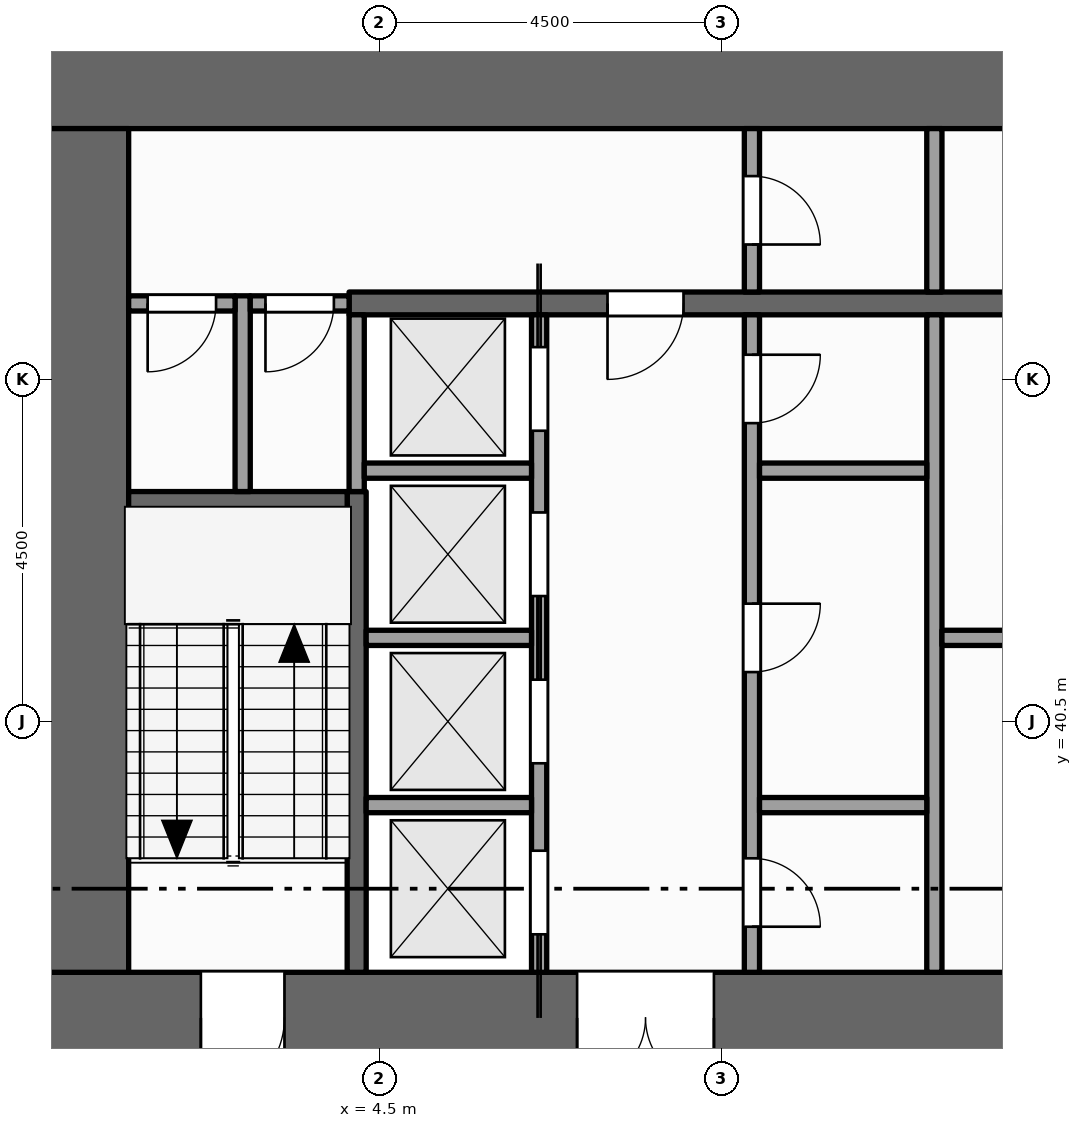
"""IFC4 building model, lengths in metres.
Left out: names, types, materials, properties, quantities, classifications, styles, units other than length and angle.
Written with IfcOpenShell. Run it as: python <this file> out.ifc"""

import sys

from ifc_helpers import new_model, si_unit, direction, frame, frame_2d, origin, place, context, subcontext, project, spatial, rectangle, extrude, element, fill, save


model = new_model("IFC4")
c1 = context("Model", 3, precision=1e-05, world=origin(), true_north=direction((0.0, 1.0)))
c2 = subcontext(c1, "Body", "Model", "MODEL_VIEW")
j1 = project(units=[si_unit("LENGTHUNIT", "METRE"), si_unit("PLANEANGLEUNIT", "RADIAN")], contexts=[c1])
p1 = place(None, origin())
s1 = spatial("IfcSite", under=j1, at=p1, CompositionType="ELEMENT")
p2 = place(p1, origin())
s2 = spatial("IfcBuilding", under=s1, at=p2, CompositionType="ELEMENT")
p3 = place(p2, frame((0.0, 0.0, 49.0)))
s3 = spatial("IfcBuildingStorey", under=s2, at=p3, CompositionType="ELEMENT", Elevation=49.0)
p4 = place(p3, frame((0.0, 36.6, -0.15), z_axis=(0.0, 0.0, 1.0), x_axis=(1.0, 0.0, 0.0)))
e1 = element("IfcWall", 1, at=p4, inside=s3, PredefinedType="SHEAR", context=c2, shape_type="SweptSolid", body=[
    extrude(rectangle(XDim=22.5, YDim=1.2, at=frame_2d((11.25, 0.0))), origin(), (0.0, 0.0, 1.0), 4.0),
])
p5 = place(p4, frame((7.1, 0.0, 0.15)))
e2 = element("IfcOpeningElement", 2, at=p5, cuts=e1, PredefinedType="OPENING", context=c2, shape_type="SweptSolid", body=[
    extrude(rectangle(XDim=1.8, YDim=2.1, at=frame_2d((0.9, 1.05))), frame((0.0, 0.61, 0.0), z_axis=(0.0, -1.0, 0.0), x_axis=(1.0, 0.0, 0.0)), (0.0, 0.0, 1.0), 1.22),
])
p6 = place(p4, frame((13.15, 0.0, 0.15)))
e3 = element("IfcOpeningElement", 3, at=p6, cuts=e1, PredefinedType="OPENING", context=c2, shape_type="SweptSolid", body=[
    extrude(rectangle(XDim=1.1, YDim=2.1, at=frame_2d((0.55, 1.05))), frame((0.0, 0.61, 0.0), z_axis=(0.0, -1.0, 0.0), x_axis=(1.0, 0.0, 0.0)), (0.0, 0.0, 1.0), 1.22),
])
p7 = place(p4, frame((2.15, 0.0, 0.15)))
e4 = element("IfcOpeningElement", 4, at=p7, cuts=e1, PredefinedType="OPENING", context=c2, shape_type="SweptSolid", body=[
    extrude(rectangle(XDim=1.1, YDim=2.1, at=frame_2d((0.55, 1.05))), frame((0.0, 0.61, 0.0), z_axis=(0.0, -1.0, 0.0), x_axis=(1.0, 0.0, 0.0)), (0.0, 0.0, 1.0), 1.22),
])
p8 = place(p4, frame((19.35, 0.0, 0.15)))
e5 = element("IfcOpeningElement", 5, at=p8, cuts=e1, PredefinedType="OPENING", context=c2, shape_type="SweptSolid", body=[
    extrude(rectangle(XDim=1.1, YDim=2.1, at=frame_2d((0.55, 1.05))), frame((0.0, 0.61, 0.0), z_axis=(0.0, -1.0, 0.0), x_axis=(1.0, 0.0, 0.0)), (0.0, 0.0, 1.0), 1.22),
])
p9 = place(p3, frame((0.0, 48.9, -0.15), z_axis=(0.0, 0.0, 1.0), x_axis=(1.0, 0.0, 0.0)))
e6 = element("IfcWall", 6, at=p9, inside=s3, PredefinedType="SHEAR", context=c2, shape_type="SweptSolid", body=[
    extrude(rectangle(XDim=22.5, YDim=1.2, at=frame_2d((11.25, 0.0))), origin(), (0.0, 0.0, 1.0), 4.0),
])
p10 = place(p3, frame((0.6, 37.2, -0.15), z_axis=(0.0, 0.0, 1.0), x_axis=(0.0, 1.0, 0.0)))
e7 = element("IfcWall", 7, at=p10, inside=s3, PredefinedType="SHEAR", context=c2, shape_type="SweptSolid", body=[
    extrude(rectangle(XDim=11.1, YDim=1.2, at=frame_2d((5.55, 0.0))), origin(), (0.0, 0.0, 1.0), 4.0),
])
p11 = place(p3, frame((2.7, 43.525, 0.0), z_axis=(0.0, 0.0, 1.0), x_axis=(0.0, 1.0, 0.0)))
e8 = element("IfcWall", 8, at=p11, inside=s3, PredefinedType="PARTITIONING", context=c2, shape_type="SweptSolid", body=[
    extrude(rectangle(XDim=2.575, YDim=0.2, at=frame_2d((1.288, 0.0))), origin(), (0.0, 0.0, 1.0), 3.85),
])
p12 = place(p3, frame((4.2, 37.2, 0.0), z_axis=(0.0, 0.0, 1.0), x_axis=(0.0, 1.0, 0.0)))
e9 = element("IfcWall", 9, at=p12, inside=s3, PredefinedType="SHEAR", context=c2, shape_type="SweptSolid", body=[
    extrude(rectangle(XDim=6.325, YDim=0.25, at=frame_2d((3.163, 0.0))), origin(), (0.0, 0.0, 1.0), 3.85),
])
p13 = place(p3, frame((4.2, 43.525, 0.0), z_axis=(0.0, 0.0, 1.0), x_axis=(0.0, 1.0, 0.0)))
e10 = element("IfcWall", 10, at=p13, inside=s3, PredefinedType="SOLIDWALL", context=c2, shape_type="SweptSolid", body=[
    extrude(rectangle(XDim=2.325, YDim=0.2, at=frame_2d((1.163, 0.0))), origin(), (0.0, 0.0, 1.0), 3.85),
])
p14 = place(p3, frame((6.6, 37.2, 0.0), z_axis=(0.0, 0.0, 1.0), x_axis=(0.0, 1.0, 0.0)))
e11 = element("IfcWall", 11, at=p14, inside=s3, PredefinedType="SOLIDWALL", context=c2, shape_type="SweptSolid", body=[
    extrude(rectangle(XDim=8.65, YDim=0.2, at=frame_2d((4.325, 0.0))), origin(), (0.0, 0.0, 1.0), 3.85),
])
p15 = place(p14, frame((0.5, 0.0, 0.012)))
e12 = element("IfcOpeningElement", 12, at=p15, cuts=e11, PredefinedType="OPENING", context=c2, shape_type="SweptSolid", body=[
    extrude(rectangle(XDim=1.1, YDim=2.1, at=frame_2d((0.55, 1.05))), frame((0.0, 0.11, 0.0), z_axis=(0.0, -1.0, 0.0), x_axis=(1.0, 0.0, 0.0)), (0.0, 0.0, 1.0), 0.22),
])
p16 = place(p14, frame((2.75, 0.0, 0.012)))
e13 = element("IfcOpeningElement", 13, at=p16, cuts=e11, PredefinedType="OPENING", context=c2, shape_type="SweptSolid", body=[
    extrude(rectangle(XDim=1.1, YDim=2.1, at=frame_2d((0.55, 1.05))), frame((0.0, 0.11, 0.0), z_axis=(0.0, -1.0, 0.0), x_axis=(1.0, 0.0, 0.0)), (0.0, 0.0, 1.0), 0.22),
])
p17 = place(p14, frame((4.95, 0.0, 0.012)))
e14 = element("IfcOpeningElement", 14, at=p17, cuts=e11, PredefinedType="OPENING", context=c2, shape_type="SweptSolid", body=[
    extrude(rectangle(XDim=1.1, YDim=2.1, at=frame_2d((0.55, 1.05))), frame((0.0, 0.11, 0.0), z_axis=(0.0, -1.0, 0.0), x_axis=(1.0, 0.0, 0.0)), (0.0, 0.0, 1.0), 0.22),
])
p18 = place(p14, frame((7.125, 0.0, 0.012)))
e15 = element("IfcOpeningElement", 15, at=p18, cuts=e11, PredefinedType="OPENING", context=c2, shape_type="SweptSolid", body=[
    extrude(rectangle(XDim=1.1, YDim=2.1, at=frame_2d((0.55, 1.05))), frame((0.0, 0.11, 0.0), z_axis=(0.0, -1.0, 0.0), x_axis=(1.0, 0.0, 0.0)), (0.0, 0.0, 1.0), 0.22),
])
p19 = place(p3, frame((9.4, 37.2, 0.0), z_axis=(0.0, 0.0, 1.0), x_axis=(0.0, 1.0, 0.0)))
e16 = element("IfcWall", 16, at=p19, inside=s3, PredefinedType="PARTITIONING", context=c2, shape_type="SweptSolid", body=[
    extrude(rectangle(XDim=8.65, YDim=0.2, at=frame_2d((4.325, 0.0))), origin(), (0.0, 0.0, 1.0), 3.85),
])
p20 = place(p19, frame((0.6, 0.0, 0.0)))
e17 = element("IfcOpeningElement", 17, at=p20, cuts=e16, PredefinedType="OPENING", context=c2, shape_type="SweptSolid", body=[
    extrude(rectangle(XDim=0.9, YDim=2.1, at=frame_2d((0.45, 1.05))), frame((0.0, 0.11, 0.0), z_axis=(0.0, -1.0, 0.0), x_axis=(1.0, 0.0, 0.0)), (0.0, 0.0, 1.0), 0.22),
])
p21 = place(p19, frame((3.95, 0.0, 0.0)))
e18 = element("IfcOpeningElement", 18, at=p21, cuts=e16, PredefinedType="OPENING", context=c2, shape_type="SweptSolid", body=[
    extrude(rectangle(XDim=0.9, YDim=2.1, at=frame_2d((0.45, 1.05))), frame((0.0, 0.11, 0.0), z_axis=(0.0, -1.0, 0.0), x_axis=(1.0, 0.0, 0.0)), (0.0, 0.0, 1.0), 0.22),
])
p22 = place(p19, frame((7.225, 0.0, 0.0)))
e19 = element("IfcOpeningElement", 19, at=p22, cuts=e16, PredefinedType="OPENING", context=c2, shape_type="SweptSolid", body=[
    extrude(rectangle(XDim=0.9, YDim=2.1, at=frame_2d((0.45, 1.05))), frame((0.0, 0.11, 0.0), z_axis=(0.0, -1.0, 0.0), x_axis=(1.0, 0.0, 0.0)), (0.0, 0.0, 1.0), 0.22),
])
p23 = place(p3, frame((9.4, 46.15, 0.0), z_axis=(0.0, 0.0, 1.0), x_axis=(0.0, 1.0, 0.0)))
e20 = element("IfcWall", 20, at=p23, inside=s3, PredefinedType="PARTITIONING", context=c2, shape_type="SweptSolid", body=[
    extrude(rectangle(XDim=2.15, YDim=0.2, at=frame_2d((1.075, 0.0))), origin(), (0.0, 0.0, 1.0), 3.85),
])
p24 = place(p23, frame((0.625, 0.0, 0.0)))
e21 = element("IfcOpeningElement", 21, at=p24, cuts=e20, PredefinedType="OPENING", context=c2, shape_type="SweptSolid", body=[
    extrude(rectangle(XDim=0.9, YDim=2.1, at=frame_2d((0.45, 1.05))), frame((0.0, 0.11, 0.0), z_axis=(0.0, -1.0, 0.0), x_axis=(1.0, 0.0, 0.0)), (0.0, 0.0, 1.0), 0.22),
])
p25 = place(p3, frame((11.8, 37.2, 0.0), z_axis=(0.0, 0.0, 1.0), x_axis=(0.0, 1.0, 0.0)))
e22 = element("IfcWall", 22, at=p25, inside=s3, PredefinedType="PARTITIONING", context=c2, shape_type="SweptSolid", body=[
    extrude(rectangle(XDim=8.65, YDim=0.2, at=frame_2d((4.325, 0.0))), origin(), (0.0, 0.0, 1.0), 3.85),
])
p26 = place(p3, frame((11.8, 46.15, 0.0), z_axis=(0.0, 0.0, 1.0), x_axis=(0.0, 1.0, 0.0)))
e23 = element("IfcWall", 23, at=p26, inside=s3, PredefinedType="PARTITIONING", context=c2, shape_type="SweptSolid", body=[
    extrude(rectangle(XDim=2.15, YDim=0.2, at=frame_2d((1.075, 0.0))), origin(), (0.0, 0.0, 1.0), 3.85),
])
p27 = place(p3, frame((4.325, 39.4, 0.0), z_axis=(0.0, 0.0, 1.0), x_axis=(1.0, 0.0, 0.0)))
e24 = element("IfcWall", 24, at=p27, inside=s3, PredefinedType="SOLIDWALL", context=c2, shape_type="SweptSolid", body=[
    extrude(rectangle(XDim=2.175, YDim=0.2, at=frame_2d((1.087, 0.0))), origin(), (0.0, 0.0, 1.0), 3.85),
])
p28 = place(p3, frame((9.5, 39.4, 0.0), z_axis=(0.0, 0.0, 1.0), x_axis=(1.0, 0.0, 0.0)))
e25 = element("IfcWall", 25, at=p28, inside=s3, PredefinedType="PARTITIONING", context=c2, shape_type="SweptSolid", body=[
    extrude(rectangle(XDim=2.2, YDim=0.2, at=frame_2d((1.1, 0.0))), origin(), (0.0, 0.0, 1.0), 3.85),
])
p29 = place(p3, frame((4.325, 41.6, 0.0), z_axis=(0.0, 0.0, 1.0), x_axis=(1.0, 0.0, 0.0)))
e26 = element("IfcWall", 26, at=p29, inside=s3, PredefinedType="SOLIDWALL", context=c2, shape_type="SweptSolid", body=[
    extrude(rectangle(XDim=2.175, YDim=0.2, at=frame_2d((1.087, 0.0))), origin(), (0.0, 0.0, 1.0), 3.85),
])
p30 = place(p3, frame((11.9, 41.6, 0.0), z_axis=(0.0, 0.0, 1.0), x_axis=(1.0, 0.0, 0.0)))
e27 = element("IfcWall", 27, at=p30, inside=s3, PredefinedType="PARTITIONING", context=c2, shape_type="SweptSolid", body=[
    extrude(rectangle(XDim=3.6, YDim=0.2, at=frame_2d((1.8, 0.0))), origin(), (0.0, 0.0, 1.0), 3.85),
])
p31 = place(p30, frame((1.3, 0.0, 0.0)))
e28 = element("IfcOpeningElement", 28, at=p31, cuts=e27, PredefinedType="OPENING", context=c2, shape_type="SweptSolid", body=[
    extrude(rectangle(XDim=1.0, YDim=2.1, at=frame_2d((0.5, 1.05))), frame((0.0, 0.11, 0.0), z_axis=(0.0, -1.0, 0.0), x_axis=(1.0, 0.0, 0.0)), (0.0, 0.0, 1.0), 0.22),
])
p32 = place(p3, frame((1.2, 43.4, 0.0), z_axis=(0.0, 0.0, 1.0), x_axis=(1.0, 0.0, 0.0)))
e29 = element("IfcWall", 29, at=p32, inside=s3, PredefinedType="SHEAR", context=c2, shape_type="SweptSolid", body=[
    extrude(rectangle(XDim=2.875, YDim=0.25, at=frame_2d((1.438, 0.0))), origin(), (0.0, 0.0, 1.0), 3.85),
])
p33 = place(p3, frame((4.3, 43.8, 0.0), z_axis=(0.0, 0.0, 1.0), x_axis=(1.0, 0.0, 0.0)))
e30 = element("IfcWall", 30, at=p33, inside=s3, PredefinedType="SOLIDWALL", context=c2, shape_type="SweptSolid", body=[
    extrude(rectangle(XDim=2.2, YDim=0.2, at=frame_2d((1.1, 0.0))), origin(), (0.0, 0.0, 1.0), 3.85),
])
p34 = place(p3, frame((9.5, 43.8, 0.0), z_axis=(0.0, 0.0, 1.0), x_axis=(1.0, 0.0, 0.0)))
e31 = element("IfcWall", 31, at=p34, inside=s3, PredefinedType="PARTITIONING", context=c2, shape_type="SweptSolid", body=[
    extrude(rectangle(XDim=2.2, YDim=0.2, at=frame_2d((1.1, 0.0))), origin(), (0.0, 0.0, 1.0), 3.85),
])
p35 = place(p3, frame((1.2, 46.0, 0.0), z_axis=(0.0, 0.0, 1.0), x_axis=(1.0, 0.0, 0.0)))
e32 = element("IfcWall", 32, at=p35, inside=s3, PredefinedType="PARTITIONING", context=c2, shape_type="SweptSolid", body=[
    extrude(rectangle(XDim=1.4, YDim=0.2, at=frame_2d((0.7, 0.0))), origin(), (0.0, 0.0, 1.0), 3.85),
])
p36 = place(p35, frame((0.25, 0.0, 0.0)))
e33 = element("IfcOpeningElement", 33, at=p36, cuts=e32, PredefinedType="OPENING", context=c2, shape_type="SweptSolid", body=[
    extrude(rectangle(XDim=0.9, YDim=2.1, at=frame_2d((0.45, 1.05))), frame((0.0, 0.11, 0.0), z_axis=(0.0, -1.0, 0.0), x_axis=(1.0, 0.0, 0.0)), (0.0, 0.0, 1.0), 0.22),
])
p37 = place(p3, frame((2.8, 46.0, 0.0), z_axis=(0.0, 0.0, 1.0), x_axis=(1.0, 0.0, 0.0)))
e34 = element("IfcWall", 34, at=p37, inside=s3, PredefinedType="PARTITIONING", context=c2, shape_type="SweptSolid", body=[
    extrude(rectangle(XDim=1.3, YDim=0.2, at=frame_2d((0.65, 0.0))), origin(), (0.0, 0.0, 1.0), 3.85),
])
p38 = place(p37, frame((0.2, 0.0, 0.0)))
e35 = element("IfcOpeningElement", 35, at=p38, cuts=e34, PredefinedType="OPENING", context=c2, shape_type="SweptSolid", body=[
    extrude(rectangle(XDim=0.9, YDim=2.1, at=frame_2d((0.45, 1.05))), frame((0.0, 0.11, 0.0), z_axis=(0.0, -1.0, 0.0), x_axis=(1.0, 0.0, 0.0)), (0.0, 0.0, 1.0), 0.22),
])
p39 = place(p3, frame((4.1, 46.0, 0.0), z_axis=(0.0, 0.0, 1.0), x_axis=(1.0, 0.0, 0.0)))
e36 = element("IfcWall", 36, at=p39, inside=s3, PredefinedType="SHEAR", context=c2, shape_type="SweptSolid", body=[
    extrude(rectangle(XDim=14.5, YDim=0.3, at=frame_2d((7.25, 0.0))), origin(), (0.0, 0.0, 1.0), 3.85),
])
p40 = place(p39, frame((3.4, 0.0, 0.0)))
e37 = element("IfcOpeningElement", 37, at=p40, cuts=e36, PredefinedType="OPENING", context=c2, shape_type="SweptSolid", body=[
    extrude(rectangle(XDim=1.0, YDim=2.1, at=frame_2d((0.5, 1.05))), frame((0.0, 0.16, 0.0), z_axis=(0.0, -1.0, 0.0), x_axis=(1.0, 0.0, 0.0)), (0.0, 0.0, 1.0), 0.32),
])
p41 = place(p39, frame((9.1, 0.0, 0.0)))
e38 = element("IfcOpeningElement", 38, at=p41, cuts=e36, PredefinedType="OPENING", context=c2, shape_type="SweptSolid", body=[
    extrude(rectangle(XDim=1.0, YDim=2.1, at=frame_2d((0.5, 1.05))), frame((0.0, 0.16, 0.0), z_axis=(0.0, -1.0, 0.0), x_axis=(1.0, 0.0, 0.0)), (0.0, 0.0, 1.0), 0.32),
])
p42 = place(p15, origin())
e39 = element("IfcDoor", 39, at=p42, inside=s3, OperationType="SLIDING_TO_LEFT", PredefinedType="DOOR", context=c2, shape_type="SweptSolid", body=[
    extrude(rectangle(XDim=1.1, YDim=2.1, at=frame_2d((0.55, 1.05))), frame((0.0, 0.025, 0.0), z_axis=(0.0, -1.0, 0.0), x_axis=(1.0, 0.0, 0.0)), (0.0, 0.0, 1.0), 0.05),
])
fill(e12, e39)
p43 = place(p16, origin())
e40 = element("IfcDoor", 40, at=p43, inside=s3, OperationType="SLIDING_TO_RIGHT", PredefinedType="DOOR", context=c2, shape_type="SweptSolid", body=[
    extrude(rectangle(XDim=1.1, YDim=2.1, at=frame_2d((0.55, 1.05))), frame((0.0, 0.025, 0.0), z_axis=(0.0, -1.0, 0.0), x_axis=(1.0, 0.0, 0.0)), (0.0, 0.0, 1.0), 0.05),
])
fill(e13, e40)
p44 = place(p17, origin())
e41 = element("IfcDoor", 41, at=p44, inside=s3, OperationType="SLIDING_TO_LEFT", PredefinedType="DOOR", context=c2, shape_type="SweptSolid", body=[
    extrude(rectangle(XDim=1.1, YDim=2.1, at=frame_2d((0.55, 1.05))), frame((0.0, 0.025, 0.0), z_axis=(0.0, -1.0, 0.0), x_axis=(1.0, 0.0, 0.0)), (0.0, 0.0, 1.0), 0.05),
])
fill(e14, e41)
p45 = place(p18, origin())
e42 = element("IfcDoor", 42, at=p45, inside=s3, OperationType="SLIDING_TO_RIGHT", PredefinedType="DOOR", context=c2, shape_type="SweptSolid", body=[
    extrude(rectangle(XDim=1.1, YDim=2.1, at=frame_2d((0.55, 1.05))), frame((0.0, 0.025, 0.0), z_axis=(0.0, -1.0, 0.0), x_axis=(1.0, 0.0, 0.0)), (0.0, 0.0, 1.0), 0.05),
])
fill(e15, e42)
p46 = place(p5, origin())
e43 = element("IfcDoor", 43, at=p46, inside=s3, OperationType="DOUBLE_DOOR_SINGLE_SWING", PredefinedType="DOOR", context=c2, shape_type="SweptSolid", body=[
    extrude(rectangle(XDim=1.8, YDim=2.1, at=frame_2d((0.9, 1.05))), frame((0.0, 0.025, 0.0), z_axis=(0.0, -1.0, 0.0), x_axis=(1.0, 0.0, 0.0)), (0.0, 0.0, 1.0), 0.05),
])
fill(e2, e43)
p47 = place(p40, origin())
e44 = element("IfcDoor", 44, at=p47, inside=s3, OperationType="SINGLE_SWING_LEFT", PredefinedType="DOOR", context=c2, shape_type="SweptSolid", body=[
    extrude(rectangle(XDim=1.0, YDim=2.1, at=frame_2d((0.5, 1.05))), frame((0.0, 0.025, 0.0), z_axis=(0.0, -1.0, 0.0), x_axis=(1.0, 0.0, 0.0)), (0.0, 0.0, 1.0), 0.05),
])
fill(e37, e44)
p48 = place(p24, origin())
e45 = element("IfcDoor", 45, at=p48, inside=s3, OperationType="SINGLE_SWING_LEFT", PredefinedType="DOOR", context=c2, shape_type="SweptSolid", body=[
    extrude(rectangle(XDim=0.9, YDim=2.1, at=frame_2d((0.45, 1.05))), frame((0.0, 0.025, 0.0), z_axis=(0.0, -1.0, 0.0), x_axis=(1.0, 0.0, 0.0)), (0.0, 0.0, 1.0), 0.05),
])
fill(e21, e45)
p49 = place(p7, origin())
e46 = element("IfcDoor", 46, at=p49, inside=s3, OperationType="SINGLE_SWING_LEFT", PredefinedType="DOOR", context=c2, shape_type="SweptSolid", body=[
    extrude(rectangle(XDim=1.1, YDim=2.1, at=frame_2d((0.55, 1.05))), frame((0.0, 0.025, 0.0), z_axis=(0.0, -1.0, 0.0), x_axis=(1.0, 0.0, 0.0)), (0.0, 0.0, 1.0), 0.05),
])
fill(e4, e46)
p50 = place(p36, origin())
e47 = element("IfcDoor", 47, at=p50, inside=s3, OperationType="SINGLE_SWING_LEFT", PredefinedType="DOOR", context=c2, shape_type="SweptSolid", body=[
    extrude(rectangle(XDim=0.9, YDim=2.1, at=frame_2d((0.45, 1.05))), frame((0.0, 0.025, 0.0), z_axis=(0.0, -1.0, 0.0), x_axis=(1.0, 0.0, 0.0)), (0.0, 0.0, 1.0), 0.05),
])
fill(e33, e47)
p51 = place(p38, origin())
e48 = element("IfcDoor", 48, at=p51, inside=s3, OperationType="SINGLE_SWING_LEFT", PredefinedType="DOOR", context=c2, shape_type="SweptSolid", body=[
    extrude(rectangle(XDim=0.9, YDim=2.1, at=frame_2d((0.45, 1.05))), frame((0.0, 0.025, 0.0), z_axis=(0.0, -1.0, 0.0), x_axis=(1.0, 0.0, 0.0)), (0.0, 0.0, 1.0), 0.05),
])
fill(e35, e48)
p52 = place(p20, origin())
e49 = element("IfcDoor", 49, at=p52, inside=s3, OperationType="SINGLE_SWING_LEFT", PredefinedType="DOOR", context=c2, shape_type="SweptSolid", body=[
    extrude(rectangle(XDim=0.9, YDim=2.1, at=frame_2d((0.45, 1.05))), frame((0.0, 0.025, 0.0), z_axis=(0.0, -1.0, 0.0), x_axis=(1.0, 0.0, 0.0)), (0.0, 0.0, 1.0), 0.05),
])
fill(e17, e49)
p53 = place(p21, origin())
e50 = element("IfcDoor", 50, at=p53, inside=s3, OperationType="SINGLE_SWING_RIGHT", PredefinedType="DOOR", context=c2, shape_type="SweptSolid", body=[
    extrude(rectangle(XDim=0.9, YDim=2.1, at=frame_2d((0.45, 1.05))), frame((0.0, 0.025, 0.0), z_axis=(0.0, -1.0, 0.0), x_axis=(1.0, 0.0, 0.0)), (0.0, 0.0, 1.0), 0.05),
])
fill(e18, e50)
p54 = place(p22, origin())
e51 = element("IfcDoor", 51, at=p54, inside=s3, OperationType="SINGLE_SWING_RIGHT", PredefinedType="DOOR", context=c2, shape_type="SweptSolid", body=[
    extrude(rectangle(XDim=0.9, YDim=2.1, at=frame_2d((0.45, 1.05))), frame((0.0, 0.025, 0.0), z_axis=(0.0, -1.0, 0.0), x_axis=(1.0, 0.0, 0.0)), (0.0, 0.0, 1.0), 0.05),
])
fill(e19, e51)
save(model, sys.argv[1])
